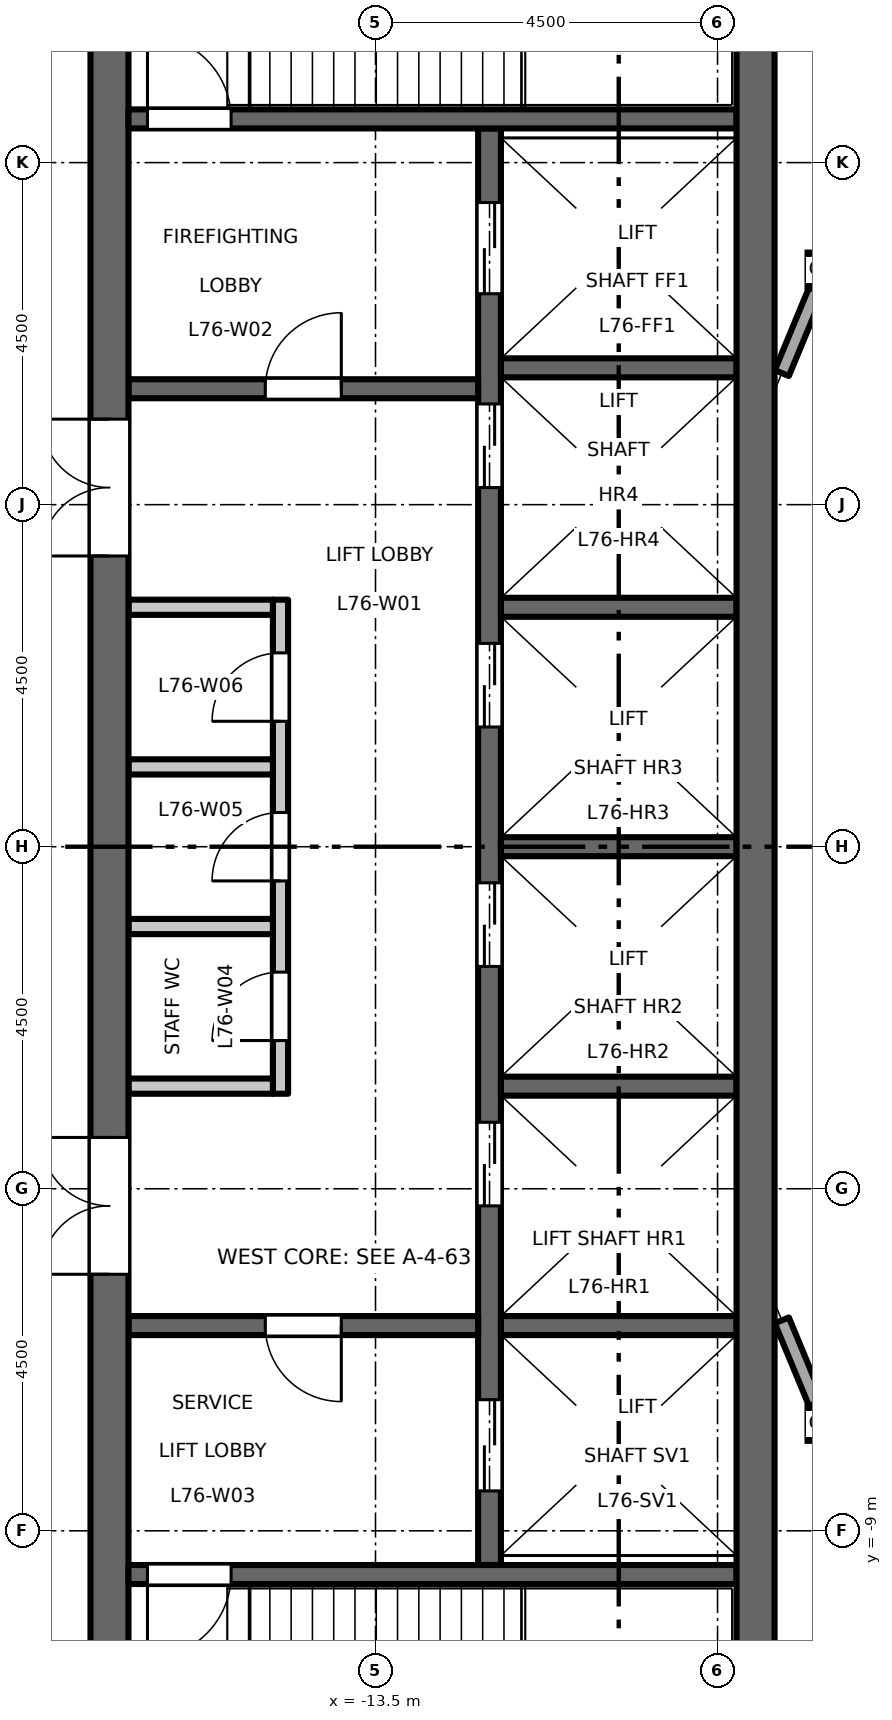
"""IFC4 building model, lengths in metres.
Left out: names, types, materials, properties, quantities, classifications, styles, units other than length and angle.
Written with IfcOpenShell. Run it as: python <this file> out.ifc"""

import sys

from ifc_helpers import new_model, si_unit, direction, frame, frame_2d, origin, origin_2d, place, context, subcontext, project, spatial, rectangle, hollow_rectangle, extrude, element, fill, save


model = new_model("IFC4")
c1 = context("Model", 3, precision=1e-05, world=origin(), true_north=direction((0.0, 1.0)))
c2 = subcontext(c1, "Body", "Model", "MODEL_VIEW")
j1 = project(units=[si_unit("LENGTHUNIT", "METRE"), si_unit("PLANEANGLEUNIT", "RADIAN")], contexts=[c1])
p1 = place(None, origin())
s1 = spatial("IfcSite", under=j1, at=p1, CompositionType="ELEMENT")
p2 = place(p1, origin())
s2 = spatial("IfcBuilding", under=s1, at=p2, CompositionType="ELEMENT")
p3 = place(p2, frame((0.0, 0.0, 353.2)))
s3 = spatial("IfcBuildingStorey", under=s2, at=p3, CompositionType="ELEMENT", Elevation=353.2)
for number, where, z_axis, x_axis in (
    (1, (-7.591, -7.591, 0.0), (0.0, 0.0, 1.0), (1.0, 0.0, 0.0)),
    (2, (-7.591, 7.591, 0.0), (0.0, 0.0, 1.0), (1.0, 0.0, 0.0)),
):
    element("IfcColumn", number, at=place(p3, frame(where, z_axis=z_axis, x_axis=x_axis)), inside=s3, PredefinedType="COLUMN", context=c2, shape_type="SweptSolid", body=[
        extrude(hollow_rectangle(XDim=0.45, YDim=0.45, WallThickness=0.022, at=origin_2d()), origin(), (0.0, 0.0, 1.0), 5.0),
    ])
p4 = place(p3, frame((-14.75, -3.25, 0.0), z_axis=(0.0, 0.0, 1.0), x_axis=(0.0, 1.0, 0.0)))
e3 = element("IfcWall", 3, at=p4, inside=s3, PredefinedType="PARTITIONING", context=c2, shape_type="SweptSolid", body=[
    extrude(rectangle(XDim=6.5, YDim=0.2, at=frame_2d((3.25, 0.0))), origin(), (0.0, 0.0, 1.0), 4.8),
])
p5 = place(p4, frame((0.7, 0.0, 0.0)))
e4 = element("IfcOpeningElement", 4, at=p5, cuts=e3, PredefinedType="OPENING", context=c2, shape_type="SweptSolid", body=[
    extrude(rectangle(XDim=0.9, YDim=2.1, at=frame_2d((0.45, 1.05))), frame((0.0, 0.11, 0.0), z_axis=(0.0, -1.0, 0.0), x_axis=(1.0, 0.0, 0.0)), (0.0, 0.0, 1.0), 0.22),
])
p6 = place(p4, frame((2.8, 0.0, 0.0)))
e5 = element("IfcOpeningElement", 5, at=p6, cuts=e3, PredefinedType="OPENING", context=c2, shape_type="SweptSolid", body=[
    extrude(rectangle(XDim=0.9, YDim=2.1, at=frame_2d((0.45, 1.05))), frame((0.0, 0.11, 0.0), z_axis=(0.0, -1.0, 0.0), x_axis=(1.0, 0.0, 0.0)), (0.0, 0.0, 1.0), 0.22),
])
p7 = place(p4, frame((4.9, 0.0, 0.0)))
e6 = element("IfcOpeningElement", 6, at=p7, cuts=e3, PredefinedType="OPENING", context=c2, shape_type="SweptSolid", body=[
    extrude(rectangle(XDim=0.9, YDim=2.1, at=frame_2d((0.45, 1.05))), frame((0.0, 0.11, 0.0), z_axis=(0.0, -1.0, 0.0), x_axis=(1.0, 0.0, 0.0)), (0.0, 0.0, 1.0), 0.22),
])
for number, where, z_axis, x_axis in (
    (7, (-14.85, 3.15, 0.0), (0.0, 0.0, 1.0), (-1.0, 0.0, 0.0)),
    (8, (-14.85, -3.15, 0.0), (0.0, 0.0, 1.0), (-1.0, 0.0, 0.0)),
    (9, (-14.85, -1.05, 0.0), (0.0, 0.0, 1.0), (-1.0, 0.0, 0.0)),
    (10, (-14.85, 1.05, 0.0), (0.0, 0.0, 1.0), (-1.0, 0.0, 0.0)),
):
    element("IfcWall", number, at=place(p3, frame(where, z_axis=z_axis, x_axis=x_axis)), inside=s3, PredefinedType="PARTITIONING", context=c2, shape_type="SweptSolid", body=[
        extrude(rectangle(XDim=1.9, YDim=0.2, at=frame_2d((0.95, 0.0))), origin(), (0.0, 0.0, 1.0), 4.8),
    ])
p8 = place(p3, frame((-12.0, -9.45, 0.0), z_axis=(0.0, 0.0, 1.0), x_axis=(0.0, 1.0, 0.0)))
e11 = element("IfcWall", 11, at=p8, inside=s3, PredefinedType="SHEAR", context=c2, shape_type="SweptSolid", body=[
    extrude(rectangle(XDim=18.9, YDim=0.3, at=frame_2d((9.45, 0.0))), origin(), (0.0, 0.0, 1.0), 4.8),
])
p9 = place(p8, frame((4.725, 0.0, 0.0)))
e12 = element("IfcOpeningElement", 12, at=p9, cuts=e11, PredefinedType="OPENING", context=c2, shape_type="SweptSolid", body=[
    extrude(rectangle(XDim=1.1, YDim=2.1, at=frame_2d((0.55, 1.05))), frame((0.0, 0.16, 0.0), z_axis=(0.0, -1.0, 0.0), x_axis=(1.0, 0.0, 0.0)), (0.0, 0.0, 1.0), 0.32),
])
p10 = place(p8, frame((7.875, 0.0, 0.0)))
e13 = element("IfcOpeningElement", 13, at=p10, cuts=e11, PredefinedType="OPENING", context=c2, shape_type="SweptSolid", body=[
    extrude(rectangle(XDim=1.1, YDim=2.1, at=frame_2d((0.55, 1.05))), frame((0.0, 0.16, 0.0), z_axis=(0.0, -1.0, 0.0), x_axis=(1.0, 0.0, 0.0)), (0.0, 0.0, 1.0), 0.32),
])
p11 = place(p8, frame((11.025, 0.0, 0.0)))
e14 = element("IfcOpeningElement", 14, at=p11, cuts=e11, PredefinedType="OPENING", context=c2, shape_type="SweptSolid", body=[
    extrude(rectangle(XDim=1.1, YDim=2.1, at=frame_2d((0.55, 1.05))), frame((0.0, 0.16, 0.0), z_axis=(0.0, -1.0, 0.0), x_axis=(1.0, 0.0, 0.0)), (0.0, 0.0, 1.0), 0.32),
])
p12 = place(p8, frame((14.175, 0.0, 0.0)))
e15 = element("IfcOpeningElement", 15, at=p12, cuts=e11, PredefinedType="OPENING", context=c2, shape_type="SweptSolid", body=[
    extrude(rectangle(XDim=1.1, YDim=2.1, at=frame_2d((0.55, 1.05))), frame((0.0, 0.16, 0.0), z_axis=(0.0, -1.0, 0.0), x_axis=(1.0, 0.0, 0.0)), (0.0, 0.0, 1.0), 0.32),
])
p13 = place(p8, frame((16.725, 0.0, 0.0)))
e16 = element("IfcOpeningElement", 16, at=p13, cuts=e11, PredefinedType="OPENING", context=c2, shape_type="SweptSolid", body=[
    extrude(rectangle(XDim=1.2, YDim=2.1, at=frame_2d((0.6, 1.05))), frame((0.0, 0.16, 0.0), z_axis=(0.0, -1.0, 0.0), x_axis=(1.0, 0.0, 0.0)), (0.0, 0.0, 1.0), 0.32),
])
p14 = place(p8, frame((0.975, 0.0, 0.0)))
e17 = element("IfcOpeningElement", 17, at=p14, cuts=e11, PredefinedType="OPENING", context=c2, shape_type="SweptSolid", body=[
    extrude(rectangle(XDim=1.2, YDim=2.1, at=frame_2d((0.6, 1.05))), frame((0.0, 0.16, 0.0), z_axis=(0.0, -1.0, 0.0), x_axis=(1.0, 0.0, 0.0)), (0.0, 0.0, 1.0), 0.32),
])
p15 = place(p3, frame((-12.15, 6.025, 0.0), z_axis=(0.0, 0.0, 1.0), x_axis=(-1.0, 0.0, 0.0)))
e18 = element("IfcWall", 18, at=p15, inside=s3, PredefinedType="SHEAR", context=c2, shape_type="SweptSolid", body=[
    extrude(rectangle(XDim=4.6, YDim=0.25, at=frame_2d((2.3, 0.0))), origin(), (0.0, 0.0, 1.0), 4.8),
])
p16 = place(p15, frame((1.8, 0.0, 0.0)))
e19 = element("IfcOpeningElement", 19, at=p16, cuts=e18, PredefinedType="OPENING", context=c2, shape_type="SweptSolid", body=[
    extrude(rectangle(XDim=1.0, YDim=2.1, at=frame_2d((0.5, 1.05))), frame((0.0, 0.135, 0.0), z_axis=(0.0, -1.0, 0.0), x_axis=(1.0, 0.0, 0.0)), (0.0, 0.0, 1.0), 0.27),
])
p17 = place(p3, frame((-12.15, -6.3, 0.0), z_axis=(0.0, 0.0, 1.0), x_axis=(-1.0, 0.0, 0.0)))
e20 = element("IfcWall", 20, at=p17, inside=s3, PredefinedType="SHEAR", context=c2, shape_type="SweptSolid", body=[
    extrude(rectangle(XDim=4.6, YDim=0.25, at=frame_2d((2.3, 0.0))), origin(), (0.0, 0.0, 1.0), 4.8),
])
p18 = place(p17, frame((1.8, 0.0, 0.0)))
e21 = element("IfcOpeningElement", 21, at=p18, cuts=e20, PredefinedType="OPENING", context=c2, shape_type="SweptSolid", body=[
    extrude(rectangle(XDim=1.0, YDim=2.1, at=frame_2d((0.5, 1.05))), frame((0.0, 0.135, 0.0), z_axis=(0.0, -1.0, 0.0), x_axis=(1.0, 0.0, 0.0)), (0.0, 0.0, 1.0), 0.27),
])
p19 = place(p3, frame((-17.0, -13.0, 0.0), z_axis=(0.0, 0.0, 1.0), x_axis=(0.0, 1.0, 0.0)))
e22 = element("IfcWall", 22, at=p19, inside=s3, PredefinedType="SHEAR", context=c2, shape_type="SweptSolid", body=[
    extrude(rectangle(XDim=26.0, YDim=0.5, at=frame_2d((13.0, 0.0))), origin(), (0.0, 0.0, 1.0), 4.8),
])
p20 = place(p19, frame((16.825, 0.0, 0.0)))
e23 = element("IfcOpeningElement", 23, at=p20, cuts=e22, PredefinedType="OPENING", context=c2, shape_type="SweptSolid", body=[
    extrude(rectangle(XDim=1.8, YDim=2.1, at=frame_2d((0.9, 1.05))), frame((0.0, 0.26, 0.0), z_axis=(0.0, -1.0, 0.0), x_axis=(1.0, 0.0, 0.0)), (0.0, 0.0, 1.0), 0.52),
])
p21 = place(p19, frame((7.375, 0.0, 0.0)))
e24 = element("IfcOpeningElement", 24, at=p21, cuts=e22, PredefinedType="OPENING", context=c2, shape_type="SweptSolid", body=[
    extrude(rectangle(XDim=1.8, YDim=2.1, at=frame_2d((0.9, 1.05))), frame((0.0, 0.26, 0.0), z_axis=(0.0, -1.0, 0.0), x_axis=(1.0, 0.0, 0.0)), (0.0, 0.0, 1.0), 0.52),
])
for number, where, z_axis, x_axis in (
    (25, (-8.75, 0.0, 0.0), (0.0, 0.0, 1.0), (-1.0, 0.0, 0.0)),
    (26, (-8.75, 3.15, 0.0), (0.0, 0.0, 1.0), (-1.0, 0.0, 0.0)),
    (27, (-8.75, 6.3, 0.0), (0.0, 0.0, 1.0), (-1.0, 0.0, 0.0)),
    (28, (-8.75, -3.15, 0.0), (0.0, 0.0, 1.0), (-1.0, 0.0, 0.0)),
    (29, (-8.75, -6.3, 0.0), (0.0, 0.0, 1.0), (-1.0, 0.0, 0.0)),
):
    element("IfcWall", number, at=place(p3, frame(where, z_axis=z_axis, x_axis=x_axis)), inside=s3, PredefinedType="SHEAR", context=c2, shape_type="SweptSolid", body=[
        extrude(rectangle(XDim=3.1, YDim=0.25, at=frame_2d((1.55, 0.0))), origin(), (0.0, 0.0, 1.0), 4.8),
    ])
p22 = place(p3, frame((-8.75, 9.575, 0.0), z_axis=(0.0, 0.0, 1.0), x_axis=(-1.0, 0.0, 0.0)))
e30 = element("IfcWall", 30, at=p22, inside=s3, PredefinedType="SHEAR", context=c2, shape_type="SweptSolid", body=[
    extrude(rectangle(XDim=8.0, YDim=0.25, at=frame_2d((4.0, 0.0))), origin(), (0.0, 0.0, 1.0), 4.8),
])
p23 = place(p22, frame((6.65, 0.0, 0.0)))
e31 = element("IfcOpeningElement", 31, at=p23, cuts=e30, PredefinedType="OPENING", context=c2, shape_type="SweptSolid", body=[
    extrude(rectangle(XDim=1.1, YDim=2.1, at=frame_2d((0.55, 1.05))), frame((0.0, 0.135, 0.0), z_axis=(0.0, -1.0, 0.0), x_axis=(1.0, 0.0, 0.0)), (0.0, 0.0, 1.0), 0.27),
])
p24 = place(p3, frame((-8.75, -9.575, 0.0), z_axis=(0.0, 0.0, 1.0), x_axis=(-1.0, 0.0, 0.0)))
e32 = element("IfcWall", 32, at=p24, inside=s3, PredefinedType="SHEAR", context=c2, shape_type="SweptSolid", body=[
    extrude(rectangle(XDim=8.0, YDim=0.25, at=frame_2d((4.0, 0.0))), origin(), (0.0, 0.0, 1.0), 4.8),
])
p25 = place(p24, frame((6.65, 0.0, 0.0)))
e33 = element("IfcOpeningElement", 33, at=p25, cuts=e32, PredefinedType="OPENING", context=c2, shape_type="SweptSolid", body=[
    extrude(rectangle(XDim=1.1, YDim=2.1, at=frame_2d((0.55, 1.05))), frame((0.0, 0.135, 0.0), z_axis=(0.0, -1.0, 0.0), x_axis=(1.0, 0.0, 0.0)), (0.0, 0.0, 1.0), 0.27),
])
p26 = place(p3, frame((-8.5, -13.0, 0.0), z_axis=(0.0, 0.0, 1.0), x_axis=(0.0, 1.0, 0.0)))
e34 = element("IfcWall", 34, at=p26, inside=s3, PredefinedType="SHEAR", context=c2, shape_type="SweptSolid", body=[
    extrude(rectangle(XDim=26.0, YDim=0.5, at=frame_2d((13.0, 0.0))), origin(), (0.0, 0.0, 1.0), 4.8),
])
for number, where, z_axis, x_axis in (
    (35, (-7.703, 7.319, 0.0), (0.0, 0.0, 1.0), (-0.383, -0.924, 0.0)),
    (36, (-8.154, -6.231, 0.0), (0.0, 0.0, 1.0), (0.383, -0.924, 0.0)),
):
    element("IfcWall", number, at=place(p3, frame(where, z_axis=z_axis, x_axis=x_axis)), inside=s3, PredefinedType="STANDARD", context=c2, shape_type="SweptSolid", body=[
        extrude(rectangle(XDim=1.178, YDim=0.2, at=frame_2d((0.589, 0.0))), origin(), (0.0, 0.0, 1.0), 4.46),
    ])
p27 = place(p16, origin())
e37 = element("IfcDoor", 37, at=p27, inside=s3, OperationType="SINGLE_SWING_LEFT", PredefinedType="DOOR", context=c2, shape_type="SweptSolid", body=[
    extrude(rectangle(XDim=1.0, YDim=2.1, at=frame_2d((0.5, 1.05))), frame((0.0, 0.025, 0.0), z_axis=(0.0, -1.0, 0.0), x_axis=(1.0, 0.0, 0.0)), (0.0, 0.0, 1.0), 0.05),
])
fill(e19, e37)
p28 = place(p18, origin())
e38 = element("IfcDoor", 38, at=p28, inside=s3, OperationType="SINGLE_SWING_RIGHT", PredefinedType="DOOR", context=c2, shape_type="SweptSolid", body=[
    extrude(rectangle(XDim=1.0, YDim=2.1, at=frame_2d((0.5, 1.05))), frame((0.0, 0.025, 0.0), z_axis=(0.0, -1.0, 0.0), x_axis=(1.0, 0.0, 0.0)), (0.0, 0.0, 1.0), 0.05),
])
fill(e21, e38)
p29 = place(p23, origin())
e39 = element("IfcDoor", 39, at=p29, inside=s3, OperationType="SINGLE_SWING_RIGHT", PredefinedType="DOOR", context=c2, shape_type="SweptSolid", body=[
    extrude(rectangle(XDim=1.1, YDim=2.1, at=frame_2d((0.55, 1.05))), frame((0.0, 0.025, 0.0), z_axis=(0.0, -1.0, 0.0), x_axis=(1.0, 0.0, 0.0)), (0.0, 0.0, 1.0), 0.05),
])
fill(e31, e39)
p30 = place(p25, origin())
e40 = element("IfcDoor", 40, at=p30, inside=s3, OperationType="SINGLE_SWING_LEFT", PredefinedType="DOOR", context=c2, shape_type="SweptSolid", body=[
    extrude(rectangle(XDim=1.1, YDim=2.1, at=frame_2d((0.55, 1.05))), frame((0.0, 0.025, 0.0), z_axis=(0.0, -1.0, 0.0), x_axis=(1.0, 0.0, 0.0)), (0.0, 0.0, 1.0), 0.05),
])
fill(e33, e40)
p31 = place(p20, origin())
e41 = element("IfcDoor", 41, at=p31, inside=s3, OperationType="DOUBLE_DOOR_DOUBLE_SWING", PredefinedType="DOOR", context=c2, shape_type="SweptSolid", body=[
    extrude(rectangle(XDim=1.8, YDim=2.1, at=frame_2d((0.9, 1.05))), frame((0.0, 0.025, 0.0), z_axis=(0.0, -1.0, 0.0), x_axis=(1.0, 0.0, 0.0)), (0.0, 0.0, 1.0), 0.05),
])
fill(e23, e41)
p32 = place(p21, origin())
e42 = element("IfcDoor", 42, at=p32, inside=s3, OperationType="DOUBLE_DOOR_DOUBLE_SWING", PredefinedType="DOOR", context=c2, shape_type="SweptSolid", body=[
    extrude(rectangle(XDim=1.8, YDim=2.1, at=frame_2d((0.9, 1.05))), frame((0.0, 0.025, 0.0), z_axis=(0.0, -1.0, 0.0), x_axis=(1.0, 0.0, 0.0)), (0.0, 0.0, 1.0), 0.05),
])
fill(e24, e42)
p33 = place(p9, origin())
e43 = element("IfcDoor", 43, at=p33, inside=s3, OperationType="DOUBLE_DOOR_SLIDING", PredefinedType="DOOR", context=c2, shape_type="SweptSolid", body=[
    extrude(rectangle(XDim=1.1, YDim=2.1, at=frame_2d((0.55, 1.05))), frame((0.0, 0.025, 0.0), z_axis=(0.0, -1.0, 0.0), x_axis=(1.0, 0.0, 0.0)), (0.0, 0.0, 1.0), 0.05),
])
fill(e12, e43)
p34 = place(p10, origin())
e44 = element("IfcDoor", 44, at=p34, inside=s3, OperationType="DOUBLE_DOOR_SLIDING", PredefinedType="DOOR", context=c2, shape_type="SweptSolid", body=[
    extrude(rectangle(XDim=1.1, YDim=2.1, at=frame_2d((0.55, 1.05))), frame((0.0, 0.025, 0.0), z_axis=(0.0, -1.0, 0.0), x_axis=(1.0, 0.0, 0.0)), (0.0, 0.0, 1.0), 0.05),
])
fill(e13, e44)
p35 = place(p11, origin())
e45 = element("IfcDoor", 45, at=p35, inside=s3, OperationType="DOUBLE_DOOR_SLIDING", PredefinedType="DOOR", context=c2, shape_type="SweptSolid", body=[
    extrude(rectangle(XDim=1.1, YDim=2.1, at=frame_2d((0.55, 1.05))), frame((0.0, 0.025, 0.0), z_axis=(0.0, -1.0, 0.0), x_axis=(1.0, 0.0, 0.0)), (0.0, 0.0, 1.0), 0.05),
])
fill(e14, e45)
p36 = place(p12, origin())
e46 = element("IfcDoor", 46, at=p36, inside=s3, OperationType="DOUBLE_DOOR_SLIDING", PredefinedType="DOOR", context=c2, shape_type="SweptSolid", body=[
    extrude(rectangle(XDim=1.1, YDim=2.1, at=frame_2d((0.55, 1.05))), frame((0.0, 0.025, 0.0), z_axis=(0.0, -1.0, 0.0), x_axis=(1.0, 0.0, 0.0)), (0.0, 0.0, 1.0), 0.05),
])
fill(e15, e46)
p37 = place(p13, origin())
e47 = element("IfcDoor", 47, at=p37, inside=s3, OperationType="DOUBLE_DOOR_SLIDING", PredefinedType="DOOR", context=c2, shape_type="SweptSolid", body=[
    extrude(rectangle(XDim=1.2, YDim=2.1, at=frame_2d((0.6, 1.05))), frame((0.0, 0.025, 0.0), z_axis=(0.0, -1.0, 0.0), x_axis=(1.0, 0.0, 0.0)), (0.0, 0.0, 1.0), 0.05),
])
fill(e16, e47)
p38 = place(p14, origin())
e48 = element("IfcDoor", 48, at=p38, inside=s3, OperationType="DOUBLE_DOOR_SLIDING", PredefinedType="DOOR", context=c2, shape_type="SweptSolid", body=[
    extrude(rectangle(XDim=1.2, YDim=2.1, at=frame_2d((0.6, 1.05))), frame((0.0, 0.025, 0.0), z_axis=(0.0, -1.0, 0.0), x_axis=(1.0, 0.0, 0.0)), (0.0, 0.0, 1.0), 0.05),
])
fill(e17, e48)
p39 = place(p5, origin())
e49 = element("IfcDoor", 49, at=p39, inside=s3, OperationType="SINGLE_SWING_RIGHT", PredefinedType="DOOR", context=c2, shape_type="SweptSolid", body=[
    extrude(rectangle(XDim=0.9, YDim=2.1, at=frame_2d((0.45, 1.05))), frame((0.0, 0.025, 0.0), z_axis=(0.0, -1.0, 0.0), x_axis=(1.0, 0.0, 0.0)), (0.0, 0.0, 1.0), 0.05),
])
fill(e4, e49)
p40 = place(p6, origin())
e50 = element("IfcDoor", 50, at=p40, inside=s3, OperationType="SINGLE_SWING_RIGHT", PredefinedType="DOOR", context=c2, shape_type="SweptSolid", body=[
    extrude(rectangle(XDim=0.9, YDim=2.1, at=frame_2d((0.45, 1.05))), frame((0.0, 0.025, 0.0), z_axis=(0.0, -1.0, 0.0), x_axis=(1.0, 0.0, 0.0)), (0.0, 0.0, 1.0), 0.05),
])
fill(e5, e50)
p41 = place(p7, origin())
e51 = element("IfcDoor", 51, at=p41, inside=s3, OperationType="SINGLE_SWING_RIGHT", PredefinedType="DOOR", context=c2, shape_type="SweptSolid", body=[
    extrude(rectangle(XDim=0.9, YDim=2.1, at=frame_2d((0.45, 1.05))), frame((0.0, 0.025, 0.0), z_axis=(0.0, -1.0, 0.0), x_axis=(1.0, 0.0, 0.0)), (0.0, 0.0, 1.0), 0.05),
])
fill(e6, e51)
save(model, sys.argv[1])
